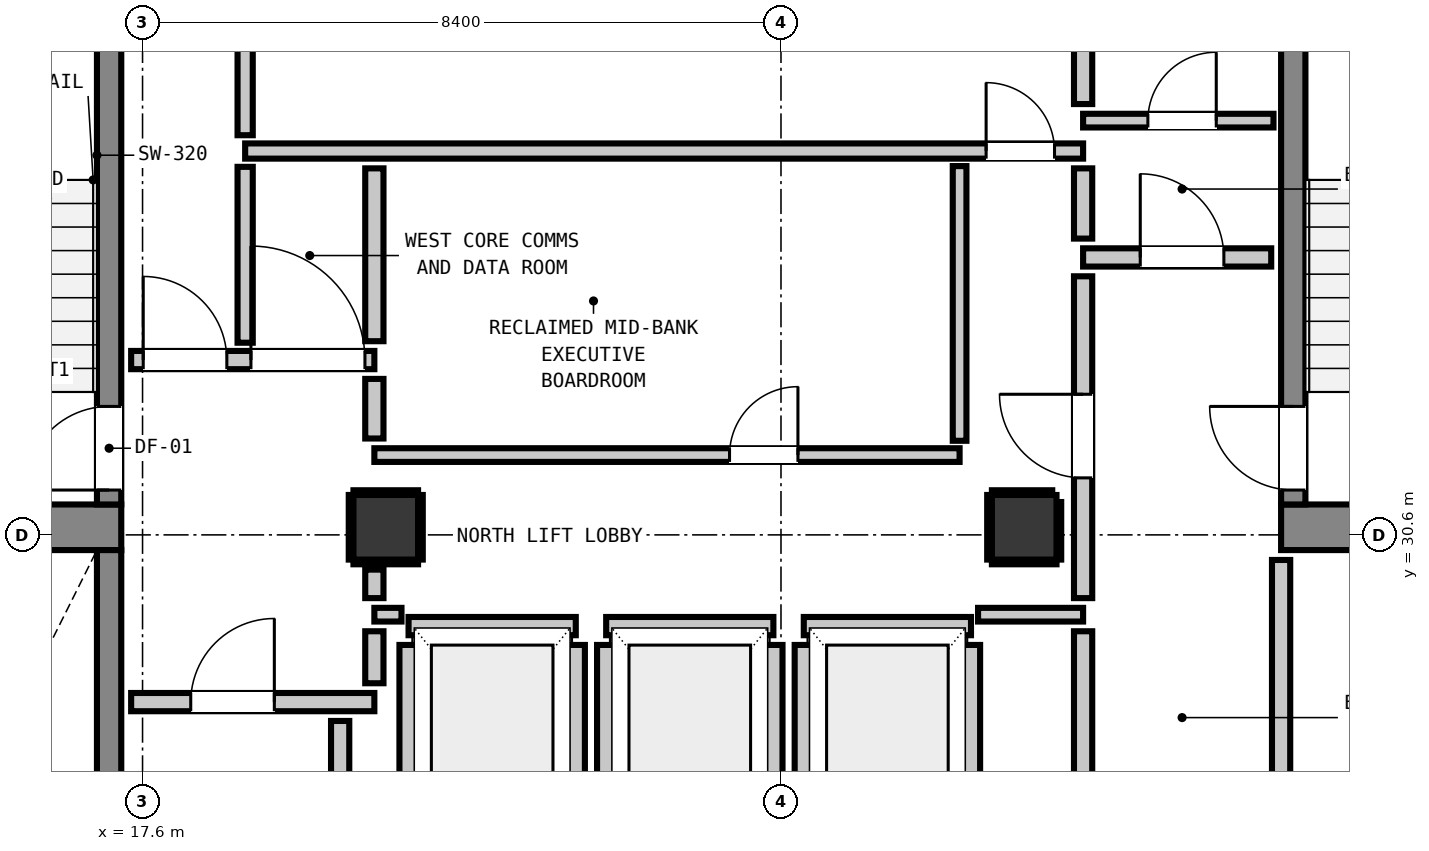
"""IFC4 building model, lengths in metres.
Left out: names, types, materials, properties, quantities, classifications, styles, units other than length and angle.
Written with IfcOpenShell. Run it as: python <this file> out.ifc"""

import sys

from ifc_helpers import new_model, si_unit, direction, frame, frame_2d, origin, origin_2d, place, context, subcontext, project, spatial, rectangle, extrude, element, fill, save


model = new_model("IFC4")
c1 = context("Model", 3, precision=1e-05, world=origin(), true_north=direction((0.0, 1.0)))
c2 = subcontext(c1, "Body", "Model", "MODEL_VIEW")
j1 = project(units=[si_unit("LENGTHUNIT", "METRE"), si_unit("PLANEANGLEUNIT", "RADIAN")], contexts=[c1])
p1 = place(None, origin())
s1 = spatial("IfcSite", under=j1, at=p1, CompositionType="ELEMENT")
p2 = place(p1, origin())
s2 = spatial("IfcBuilding", under=s1, at=p2, CompositionType="ELEMENT")
p3 = place(p2, frame((0.0, 0.0, 176.88)))
s3 = spatial("IfcBuildingStorey", under=s2, at=p3, CompositionType="ELEMENT", Elevation=176.88)
for number, where, z_axis, x_axis in (
    (1, (13.78, 30.7, 0.0), (0.0, 0.0, 1.0), (1.0, 0.0, 0.0)),
    (2, (32.58, 30.7, 0.0), (0.0, 0.0, 1.0), (1.0, 0.0, 0.0)),
):
    element("IfcWall", number, at=place(p3, frame(where, z_axis=z_axis, x_axis=x_axis)), inside=s3, PredefinedType="SHEAR", context=c2, shape_type="SweptSolid", body=[
        extrude(rectangle(XDim=3.54, YDim=0.6, at=frame_2d((1.77, 0.0))), origin(), (0.0, 0.0, 1.0), 3.32),
    ])
p4 = place(p3, frame((17.16, 31.0, 0.0), z_axis=(0.0, 0.0, 1.0), x_axis=(0.0, 1.0, 0.0)))
e3 = element("IfcWall", 3, at=p4, inside=s3, PredefinedType="SHEAR", context=c2, shape_type="SweptSolid", body=[
    extrude(rectangle(XDim=7.8, YDim=0.32, at=frame_2d((3.9, 0.0))), origin(), (0.0, 0.0, 1.0), 3.32),
])
p5 = place(p4, frame((0.19, 0.0, 0.0)))
e4 = element("IfcOpeningElement", 4, at=p5, cuts=e3, PredefinedType="OPENING", context=c2, shape_type="SweptSolid", body=[
    extrude(rectangle(XDim=1.1, YDim=2.15, at=frame_2d((0.55, 1.075))), frame((0.0, 0.17, 0.0), z_axis=(0.0, -1.0, 0.0), x_axis=(1.0, 0.0, 0.0)), (0.0, 0.0, 1.0), 0.34),
])
p6 = place(p3, frame((17.16, 22.4, 0.0), z_axis=(0.0, 0.0, 1.0), x_axis=(0.0, 1.0, 0.0)))
e5 = element("IfcWall", 5, at=p6, inside=s3, PredefinedType="SHEAR", context=c2, shape_type="SweptSolid", body=[
    extrude(rectangle(XDim=8.0, YDim=0.32, at=frame_2d((4.0, 0.0))), origin(), (0.0, 0.0, 1.0), 3.32),
])
p7 = place(p6, frame((0.39, 0.0, 0.0)))
e6 = element("IfcOpeningElement", 6, at=p7, cuts=e5, PredefinedType="OPENING", context=c2, shape_type="SweptSolid", body=[
    extrude(rectangle(XDim=1.1, YDim=2.15, at=frame_2d((0.55, 1.075))), frame((0.0, 0.17, 0.0), z_axis=(0.0, -1.0, 0.0), x_axis=(1.0, 0.0, 0.0)), (0.0, 0.0, 1.0), 0.34),
])
p8 = place(p3, frame((32.74, 31.0, 0.0), z_axis=(0.0, 0.0, 1.0), x_axis=(0.0, 1.0, 0.0)))
e7 = element("IfcWall", 7, at=p8, inside=s3, PredefinedType="SHEAR", context=c2, shape_type="SweptSolid", body=[
    extrude(rectangle(XDim=7.8, YDim=0.32, at=frame_2d((3.9, 0.0))), origin(), (0.0, 0.0, 1.0), 3.32),
])
p9 = place(p8, frame((0.19, 0.0, 0.0)))
e8 = element("IfcOpeningElement", 8, at=p9, cuts=e7, PredefinedType="OPENING", context=c2, shape_type="SweptSolid", body=[
    extrude(rectangle(XDim=1.1, YDim=2.15, at=frame_2d((0.55, 1.075))), frame((0.0, 0.17, 0.0), z_axis=(0.0, -1.0, 0.0), x_axis=(1.0, 0.0, 0.0)), (0.0, 0.0, 1.0), 0.34),
])
for number, where, z_axis, x_axis in (
    (9, (20.8, 30.7, 0.0), (0.0, 0.0, 1.0), (1.0, 0.0, 0.0)),
    (10, (29.2, 30.7, 0.0), (0.0, 0.0, 1.0), (1.0, 0.0, 0.0)),
):
    element("IfcColumn", number, at=place(p3, frame(where, z_axis=z_axis, x_axis=x_axis)), inside=s3, PredefinedType="COLUMN", context=c2, shape_type="SweptSolid", body=[
        extrude(rectangle(XDim=0.85, YDim=0.85, at=origin_2d()), origin(), (0.0, 0.0, 1.0), 3.32),
    ])
p10 = place(p3, frame((21.1, 29.4, 0.0), z_axis=(0.0, 0.0, 1.0), x_axis=(1.0, 0.0, 0.0)))
e11 = element("IfcWall", 11, at=p10, inside=s3, PredefinedType="PARTITIONING", context=c2, shape_type="SweptSolid", body=[
    extrude(rectangle(XDim=2.2, YDim=0.24, at=frame_2d((1.1, 0.0))), origin(), (0.0, 0.0, 1.0), 3.08),
])
p11 = place(p3, frame((21.1, 27.048, 0.0), z_axis=(0.0, 0.0, 1.0), x_axis=(0.0, 1.0, 0.0)))
e12 = element("IfcWall", 12, at=p11, inside=s3, PredefinedType="PARTITIONING", context=c2, shape_type="SweptSolid", body=[
    extrude(rectangle(XDim=2.104, YDim=0.24, at=frame_2d((1.052, 0.0))), origin(), (0.0, 0.0, 1.0), 2.315),
])
p12 = place(p3, frame((23.3, 27.048, 0.0), z_axis=(0.0, 0.0, 1.0), x_axis=(0.0, 1.0, 0.0)))
e13 = element("IfcWall", 13, at=p12, inside=s3, PredefinedType="PARTITIONING", context=c2, shape_type="SweptSolid", body=[
    extrude(rectangle(XDim=2.104, YDim=0.24, at=frame_2d((1.052, 0.0))), origin(), (0.0, 0.0, 1.0), 3.08),
])
p13 = place(p3, frame((23.7, 29.4, 0.0), z_axis=(0.0, 0.0, 1.0), x_axis=(1.0, 0.0, 0.0)))
e14 = element("IfcWall", 14, at=p13, inside=s3, PredefinedType="PARTITIONING", context=c2, shape_type="SweptSolid", body=[
    extrude(rectangle(XDim=2.2, YDim=0.24, at=frame_2d((1.1, 0.0))), origin(), (0.0, 0.0, 1.0), 3.08),
])
for number, where, z_axis, x_axis in (
    (15, (23.7, 27.048, 0.0), (0.0, 0.0, 1.0), (0.0, 1.0, 0.0)),
    (16, (25.9, 27.048, 0.0), (0.0, 0.0, 1.0), (0.0, 1.0, 0.0)),
):
    element("IfcWall", number, at=place(p3, frame(where, z_axis=z_axis, x_axis=x_axis)), inside=s3, PredefinedType="PARTITIONING", context=c2, shape_type="SweptSolid", body=[
        extrude(rectangle(XDim=2.104, YDim=0.24, at=frame_2d((1.052, 0.0))), origin(), (0.0, 0.0, 1.0), 3.08),
    ])
p14 = place(p3, frame((26.3, 29.4, 0.0), z_axis=(0.0, 0.0, 1.0), x_axis=(1.0, 0.0, 0.0)))
e17 = element("IfcWall", 17, at=p14, inside=s3, PredefinedType="PARTITIONING", context=c2, shape_type="SweptSolid", body=[
    extrude(rectangle(XDim=2.2, YDim=0.24, at=frame_2d((1.1, 0.0))), origin(), (0.0, 0.0, 1.0), 3.08),
])
p15 = place(p3, frame((26.3, 27.048, 0.0), z_axis=(0.0, 0.0, 1.0), x_axis=(0.0, 1.0, 0.0)))
e18 = element("IfcWall", 18, at=p15, inside=s3, PredefinedType="PARTITIONING", context=c2, shape_type="SweptSolid", body=[
    extrude(rectangle(XDim=2.104, YDim=0.24, at=frame_2d((1.052, 0.0))), origin(), (0.0, 0.0, 1.0), 3.08),
])
p16 = place(p3, frame((28.5, 27.33, 0.0), z_axis=(0.0, 0.0, 1.0), x_axis=(0.0, 1.0, 0.0)))
e19 = element("IfcWall", 19, at=p16, inside=s3, PredefinedType="PARTITIONING", context=c2, shape_type="SweptSolid", body=[
    extrude(rectangle(XDim=1.822, YDim=0.24, at=frame_2d((0.911, 0.0))), origin(), (0.0, 0.0, 1.0), 3.08),
])
p17 = place(p3, frame((17.45, 28.4, 0.0), z_axis=(0.0, 0.0, 1.0), x_axis=(1.0, 0.0, 0.0)))
e20 = element("IfcWall", 20, at=p17, inside=s3, PredefinedType="PARTITIONING", context=c2, shape_type="SweptSolid", body=[
    extrude(rectangle(XDim=3.2, YDim=0.24, at=frame_2d((1.6, 0.0))), origin(), (0.0, 0.0, 1.0), 3.08),
])
p18 = place(p17, frame((0.784, 0.0, 0.0)))
e21 = element("IfcOpeningElement", 21, at=p18, cuts=e20, PredefinedType="OPENING", context=c2, shape_type="SweptSolid", body=[
    extrude(rectangle(XDim=1.1, YDim=2.15, at=frame_2d((0.55, 1.075))), frame((0.0, 0.13, 0.0), z_axis=(0.0, -1.0, 0.0), x_axis=(1.0, 0.0, 0.0)), (0.0, 0.0, 1.0), 0.26),
])
p19 = place(p3, frame((17.45, 32.9, 0.0), z_axis=(0.0, 0.0, 1.0), x_axis=(1.0, 0.0, 0.0)))
e22 = element("IfcWall", 22, at=p19, inside=s3, PredefinedType="PARTITIONING", context=c2, shape_type="SweptSolid", body=[
    extrude(rectangle(XDim=3.2, YDim=0.24, at=frame_2d((1.6, 0.0))), origin(), (0.0, 0.0, 1.0), 3.08),
])
p20 = place(p19, frame((0.159, 0.0, 0.0)))
e23 = element("IfcOpeningElement", 23, at=p20, cuts=e22, PredefinedType="OPENING", context=c2, shape_type="SweptSolid", body=[
    extrude(rectangle(XDim=1.1, YDim=2.15, at=frame_2d((0.55, 1.075))), frame((0.0, 0.13, 0.0), z_axis=(0.0, -1.0, 0.0), x_axis=(1.0, 0.0, 0.0)), (0.0, 0.0, 1.0), 0.26),
])
p21 = place(p19, frame((1.576, 0.0, 0.0)))
e24 = element("IfcOpeningElement", 24, at=p21, cuts=e22, PredefinedType="OPENING", context=c2, shape_type="SweptSolid", body=[
    extrude(rectangle(XDim=1.5, YDim=2.15, at=frame_2d((0.75, 1.075))), frame((0.0, 0.13, 0.0), z_axis=(0.0, -1.0, 0.0), x_axis=(1.0, 0.0, 0.0)), (0.0, 0.0, 1.0), 0.26),
])
p22 = place(p3, frame((29.975, 34.25, 0.0), z_axis=(0.0, 0.0, 1.0), x_axis=(1.0, 0.0, 0.0)))
e25 = element("IfcWall", 25, at=p22, inside=s3, PredefinedType="PARTITIONING", context=c2, shape_type="SweptSolid", body=[
    extrude(rectangle(XDim=2.475, YDim=0.24, at=frame_2d((1.237, 0.0))), origin(), (0.0, 0.0, 1.0), 3.08),
])
p23 = place(p22, frame((0.752, 0.0, 0.0)))
e26 = element("IfcOpeningElement", 26, at=p23, cuts=e25, PredefinedType="OPENING", context=c2, shape_type="SweptSolid", body=[
    extrude(rectangle(XDim=1.1, YDim=2.15, at=frame_2d((0.55, 1.075))), frame((0.0, 0.13, 0.0), z_axis=(0.0, -1.0, 0.0), x_axis=(1.0, 0.0, 0.0)), (0.0, 0.0, 1.0), 0.26),
])
p24 = place(p3, frame((18.95, 35.65, 0.0), z_axis=(0.0, 0.0, 1.0), x_axis=(1.0, 0.0, 0.0)))
e27 = element("IfcWall", 27, at=p24, inside=s3, PredefinedType="PARTITIONING", context=c2, shape_type="SweptSolid", body=[
    extrude(rectangle(XDim=11.025, YDim=0.2, at=frame_2d((5.513, 0.0))), origin(), (0.0, 0.0, 1.0), 3.08),
])
p25 = place(p24, frame((9.749, 0.0, 0.0)))
e28 = element("IfcOpeningElement", 28, at=p25, cuts=e27, PredefinedType="OPENING", context=c2, shape_type="SweptSolid", body=[
    extrude(rectangle(XDim=0.9, YDim=2.1, at=frame_2d((0.45, 1.05))), frame((0.0, 0.11, 0.0), z_axis=(0.0, -1.0, 0.0), x_axis=(1.0, 0.0, 0.0)), (0.0, 0.0, 1.0), 0.22),
])
p26 = place(p3, frame((20.65, 29.55, 0.0), z_axis=(0.0, 0.0, 1.0), x_axis=(1.0, 0.0, 0.0)))
e29 = element("IfcWall", 29, at=p26, inside=s3, PredefinedType="PARTITIONING", context=c2, shape_type="SweptSolid", body=[
    extrude(rectangle(XDim=0.357, YDim=0.18, at=frame_2d((0.179, 0.0))), origin(), (0.0, 0.0, 1.0), 3.08),
])
p27 = place(p3, frame((28.593, 29.55, 0.0), z_axis=(0.0, 0.0, 1.0), x_axis=(1.0, 0.0, 0.0)))
e30 = element("IfcWall", 30, at=p27, inside=s3, PredefinedType="PARTITIONING", context=c2, shape_type="SweptSolid", body=[
    extrude(rectangle(XDim=1.382, YDim=0.18, at=frame_2d((0.691, 0.0))), origin(), (0.0, 0.0, 1.0), 3.08),
])
p28 = place(p3, frame((20.65, 31.65, 0.0), z_axis=(0.0, 0.0, 1.0), x_axis=(1.0, 0.0, 0.0)))
e31 = element("IfcWall", 31, at=p28, inside=s3, PredefinedType="PARTITIONING", context=c2, shape_type="SweptSolid", body=[
    extrude(rectangle(XDim=7.7, YDim=0.18, at=frame_2d((3.85, 0.0))), origin(), (0.0, 0.0, 1.0), 3.08),
])
p29 = place(p28, frame((4.673, 0.0, 0.0)))
e32 = element("IfcOpeningElement", 32, at=p29, cuts=e31, PredefinedType="OPENING", context=c2, shape_type="SweptSolid", body=[
    extrude(rectangle(XDim=0.9, YDim=2.1, at=frame_2d((0.45, 1.05))), frame((0.0, 0.1, 0.0), z_axis=(0.0, -1.0, 0.0), x_axis=(1.0, 0.0, 0.0)), (0.0, 0.0, 1.0), 0.2),
])
p30 = place(p3, frame((29.975, 36.05, 0.0), z_axis=(0.0, 0.0, 1.0), x_axis=(1.0, 0.0, 0.0)))
e33 = element("IfcWall", 33, at=p30, inside=s3, PredefinedType="PARTITIONING", context=c2, shape_type="SweptSolid", body=[
    extrude(rectangle(XDim=2.505, YDim=0.18, at=frame_2d((1.252, 0.0))), origin(), (0.0, 0.0, 1.0), 3.08),
])
p31 = place(p30, frame((0.852, 0.0, 0.0)))
e34 = element("IfcOpeningElement", 34, at=p31, cuts=e33, PredefinedType="OPENING", context=c2, shape_type="SweptSolid", body=[
    extrude(rectangle(XDim=0.9, YDim=2.1, at=frame_2d((0.45, 1.05))), frame((0.0, 0.1, 0.0), z_axis=(0.0, -1.0, 0.0), x_axis=(1.0, 0.0, 0.0)), (0.0, 0.0, 1.0), 0.2),
])
p32 = place(p3, frame((20.2, 21.398, 0.0), z_axis=(0.0, 0.0, 1.0), x_axis=(0.0, 1.0, 0.0)))
e35 = element("IfcWall", 35, at=p32, inside=s3, PredefinedType="PARTITIONING", context=c2, shape_type="SweptSolid", body=[
    extrude(rectangle(XDim=6.754, YDim=0.24, at=frame_2d((3.377, 0.0))), origin(), (0.0, 0.0, 1.0), 3.08),
])
p33 = place(p3, frame((20.65, 28.648, 0.0), z_axis=(0.0, 0.0, 1.0), x_axis=(0.0, 1.0, 0.0)))
e36 = element("IfcWall", 36, at=p33, inside=s3, PredefinedType="PARTITIONING", context=c2, shape_type="SweptSolid", body=[
    extrude(rectangle(XDim=0.684, YDim=0.24, at=frame_2d((0.342, 0.0))), origin(), (0.0, 0.0, 1.0), 2.315),
])
p34 = place(p3, frame((20.65, 29.768, 0.0), z_axis=(0.0, 0.0, 1.0), x_axis=(0.0, 1.0, 0.0)))
e37 = element("IfcWall", 37, at=p34, inside=s3, PredefinedType="PARTITIONING", context=c2, shape_type="SweptSolid", body=[
    extrude(rectangle(XDim=0.375, YDim=0.24, at=frame_2d((0.188, 0.0))), origin(), (0.0, 0.0, 1.0), 2.315),
])
p35 = place(p3, frame((20.65, 31.868, 0.0), z_axis=(0.0, 0.0, 1.0), x_axis=(0.0, 1.0, 0.0)))
e38 = element("IfcWall", 38, at=p35, inside=s3, PredefinedType="PARTITIONING", context=c2, shape_type="SweptSolid", body=[
    extrude(rectangle(XDim=0.784, YDim=0.24, at=frame_2d((0.392, 0.0))), origin(), (0.0, 0.0, 1.0), 2.315),
])
p36 = place(p3, frame((20.65, 33.148, 0.0), z_axis=(0.0, 0.0, 1.0), x_axis=(0.0, 1.0, 0.0)))
e39 = element("IfcWall", 39, at=p36, inside=s3, PredefinedType="PARTITIONING", context=c2, shape_type="SweptSolid", body=[
    extrude(rectangle(XDim=2.274, YDim=0.24, at=frame_2d((1.137, 0.0))), origin(), (0.0, 0.0, 1.0), 2.315),
])
p37 = place(p3, frame((29.975, 25.648, 0.0), z_axis=(0.0, 0.0, 1.0), x_axis=(0.0, 1.0, 0.0)))
e40 = element("IfcWall", 40, at=p37, inside=s3, PredefinedType="PARTITIONING", context=c2, shape_type="SweptSolid", body=[
    extrude(rectangle(XDim=3.684, YDim=0.24, at=frame_2d((1.842, 0.0))), origin(), (0.0, 0.0, 1.0), 3.08),
])
p38 = place(p3, frame((29.975, 29.768, 0.0), z_axis=(0.0, 0.0, 1.0), x_axis=(0.0, 1.0, 0.0)))
e41 = element("IfcWall", 41, at=p38, inside=s3, PredefinedType="PARTITIONING", context=c2, shape_type="SweptSolid", body=[
    extrude(rectangle(XDim=4.234, YDim=0.24, at=frame_2d((2.117, 0.0))), origin(), (0.0, 0.0, 1.0), 3.08),
])
p39 = place(p38, frame((1.582, 0.0, 0.0)))
e42 = element("IfcOpeningElement", 42, at=p39, cuts=e41, PredefinedType="OPENING", context=c2, shape_type="SweptSolid", body=[
    extrude(rectangle(XDim=1.1, YDim=2.15, at=frame_2d((0.55, 1.075))), frame((0.0, 0.13, 0.0), z_axis=(0.0, -1.0, 0.0), x_axis=(1.0, 0.0, 0.0)), (0.0, 0.0, 1.0), 0.26),
])
p40 = place(p3, frame((29.975, 34.498, 0.0), z_axis=(0.0, 0.0, 1.0), x_axis=(0.0, 1.0, 0.0)))
e43 = element("IfcWall", 43, at=p40, inside=s3, PredefinedType="PARTITIONING", context=c2, shape_type="SweptSolid", body=[
    extrude(rectangle(XDim=0.924, YDim=0.24, at=frame_2d((0.462, 0.0))), origin(), (0.0, 0.0, 1.0), 3.08),
])
p41 = place(p3, frame((29.975, 36.268, 0.0), z_axis=(0.0, 0.0, 1.0), x_axis=(0.0, 1.0, 0.0)))
e44 = element("IfcWall", 44, at=p41, inside=s3, PredefinedType="PARTITIONING", context=c2, shape_type="SweptSolid", body=[
    extrude(rectangle(XDim=2.294, YDim=0.24, at=frame_2d((1.147, 0.0))), origin(), (0.0, 0.0, 1.0), 3.08),
])
p42 = place(p3, frame((32.58, 25.648, 0.0), z_axis=(0.0, 0.0, 1.0), x_axis=(0.0, 1.0, 0.0)))
e45 = element("IfcWall", 45, at=p42, inside=s3, PredefinedType="PARTITIONING", context=c2, shape_type="SweptSolid", body=[
    extrude(rectangle(XDim=4.622, YDim=0.24, at=frame_2d((2.311, 0.0))), origin(), (0.0, 0.0, 1.0), 3.08),
])
p43 = place(p3, frame((18.95, 33.128, 0.0), z_axis=(0.0, 0.0, 1.0), x_axis=(0.0, 1.0, 0.0)))
e46 = element("IfcWall", 46, at=p43, inside=s3, PredefinedType="PARTITIONING", context=c2, shape_type="SweptSolid", body=[
    extrude(rectangle(XDim=2.314, YDim=0.2, at=frame_2d((1.157, 0.0))), origin(), (0.0, 0.0, 1.0), 3.08),
])
p44 = place(p3, frame((18.95, 35.858, 0.0), z_axis=(0.0, 0.0, 1.0), x_axis=(0.0, 1.0, 0.0)))
e47 = element("IfcWall", 47, at=p44, inside=s3, PredefinedType="PARTITIONING", context=c2, shape_type="SweptSolid", body=[
    extrude(rectangle(XDim=2.724, YDim=0.2, at=frame_2d((1.362, 0.0))), origin(), (0.0, 0.0, 1.0), 3.08),
])
p45 = place(p3, frame((28.35, 31.838, 0.0), z_axis=(0.0, 0.0, 1.0), x_axis=(0.0, 1.0, 0.0)))
e48 = element("IfcWall", 48, at=p45, inside=s3, PredefinedType="PARTITIONING", context=c2, shape_type="SweptSolid", body=[
    extrude(rectangle(XDim=3.614, YDim=0.18, at=frame_2d((1.807, 0.0))), origin(), (0.0, 0.0, 1.0), 3.08),
])
for number, where, z_axis, x_axis in (
    (49, (20.375, 30.243, 0.0), (0.0, 0.0, 1.0), (1.0, 0.0, 0.0)),
    (50, (20.375, 31.157, 0.0), (0.0, 0.0, 1.0), (1.0, 0.0, 0.0)),
    (51, (20.343, 30.275, 0.0), (0.0, 0.0, 1.0), (0.0, 1.0, 0.0)),
    (52, (21.257, 30.275, 0.0), (0.0, 0.0, 1.0), (0.0, 1.0, 0.0)),
    (53, (28.775, 30.243, 0.0), (0.0, 0.0, 1.0), (1.0, 0.0, 0.0)),
):
    element("IfcWall", number, at=place(p3, frame(where, z_axis=z_axis, x_axis=x_axis)), inside=s3, PredefinedType="PARTITIONING", context=c2, shape_type="SweptSolid", body=[
        extrude(rectangle(XDim=0.85, YDim=0.06, at=frame_2d((0.425, 0.0))), origin(), (0.0, 0.0, 1.0), 1.45),
    ])
p46 = place(p3, frame((28.775, 31.157, 0.0), z_axis=(0.0, 0.0, 1.0), x_axis=(1.0, 0.0, 0.0)))
e54 = element("IfcWall", 54, at=p46, inside=s3, PredefinedType="PARTITIONING", context=c2, shape_type="SweptSolid", body=[
    extrude(rectangle(XDim=0.794, YDim=0.06, at=frame_2d((0.397, 0.0))), origin(), (0.0, 0.0, 1.0), 1.45),
])
p47 = place(p3, frame((28.743, 30.275, 0.0), z_axis=(0.0, 0.0, 1.0), x_axis=(0.0, 1.0, 0.0)))
e55 = element("IfcWall", 55, at=p47, inside=s3, PredefinedType="PARTITIONING", context=c2, shape_type="SweptSolid", body=[
    extrude(rectangle(XDim=0.85, YDim=0.06, at=frame_2d((0.425, 0.0))), origin(), (0.0, 0.0, 1.0), 1.45),
])
p48 = place(p3, frame((29.657, 30.275, 0.0), z_axis=(0.0, 0.0, 1.0), x_axis=(0.0, 1.0, 0.0)))
e56 = element("IfcWall", 56, at=p48, inside=s3, PredefinedType="PARTITIONING", context=c2, shape_type="SweptSolid", body=[
    extrude(rectangle(XDim=0.757, YDim=0.06, at=frame_2d((0.378, 0.0))), origin(), (0.0, 0.0, 1.0), 1.45),
])
p49 = place(p5, origin())
e57 = element("IfcDoor", 57, at=p49, inside=s3, OperationType="SINGLE_SWING_LEFT", PredefinedType="DOOR", context=c2, shape_type="SweptSolid", body=[
    extrude(rectangle(XDim=1.1, YDim=2.15, at=frame_2d((0.55, 1.075))), frame((0.0, 0.025, 0.0), z_axis=(0.0, -1.0, 0.0), x_axis=(1.0, 0.0, 0.0)), (0.0, 0.0, 1.0), 0.05),
])
fill(e4, e57)
p50 = place(p9, origin())
e58 = element("IfcDoor", 58, at=p50, inside=s3, OperationType="SINGLE_SWING_RIGHT", PredefinedType="DOOR", context=c2, shape_type="SweptSolid", body=[
    extrude(rectangle(XDim=1.1, YDim=2.15, at=frame_2d((0.55, 1.075))), frame((0.0, 0.025, 0.0), z_axis=(0.0, -1.0, 0.0), x_axis=(1.0, 0.0, 0.0)), (0.0, 0.0, 1.0), 0.05),
])
fill(e8, e58)
p51 = place(p18, origin())
e59 = element("IfcDoor", 59, at=p51, inside=s3, OperationType="SINGLE_SWING_RIGHT", PredefinedType="DOOR", context=c2, shape_type="SweptSolid", body=[
    extrude(rectangle(XDim=1.1, YDim=2.15, at=frame_2d((0.55, 1.075))), frame((0.0, 0.025, 0.0), z_axis=(0.0, -1.0, 0.0), x_axis=(1.0, 0.0, 0.0)), (0.0, 0.0, 1.0), 0.05),
])
fill(e21, e59)
p52 = place(p20, origin())
e60 = element("IfcDoor", 60, at=p52, inside=s3, OperationType="SINGLE_SWING_LEFT", PredefinedType="DOOR", context=c2, shape_type="SweptSolid", body=[
    extrude(rectangle(XDim=1.1, YDim=2.15, at=frame_2d((0.55, 1.075))), frame((0.0, 0.025, 0.0), z_axis=(0.0, -1.0, 0.0), x_axis=(1.0, 0.0, 0.0)), (0.0, 0.0, 1.0), 0.05),
])
fill(e23, e60)
p53 = place(p39, origin())
e61 = element("IfcDoor", 61, at=p53, inside=s3, OperationType="SINGLE_SWING_RIGHT", PredefinedType="DOOR", context=c2, shape_type="SweptSolid", body=[
    extrude(rectangle(XDim=1.1, YDim=2.15, at=frame_2d((0.55, 1.075))), frame((0.0, 0.025, 0.0), z_axis=(0.0, -1.0, 0.0), x_axis=(1.0, 0.0, 0.0)), (0.0, 0.0, 1.0), 0.05),
])
fill(e42, e61)
p54 = place(p23, origin())
e62 = element("IfcDoor", 62, at=p54, inside=s3, OperationType="SINGLE_SWING_LEFT", PredefinedType="DOOR", context=c2, shape_type="SweptSolid", body=[
    extrude(rectangle(XDim=1.1, YDim=2.15, at=frame_2d((0.55, 1.075))), frame((0.0, 0.025, 0.0), z_axis=(0.0, -1.0, 0.0), x_axis=(1.0, 0.0, 0.0)), (0.0, 0.0, 1.0), 0.05),
])
fill(e26, e62)
p55 = place(p21, origin())
e63 = element("IfcDoor", 63, at=p55, inside=s3, OperationType="SINGLE_SWING_LEFT", PredefinedType="DOOR", context=c2, shape_type="SweptSolid", body=[
    extrude(rectangle(XDim=1.5, YDim=2.15, at=frame_2d((0.75, 1.075))), frame((0.0, 0.025, 0.0), z_axis=(0.0, -1.0, 0.0), x_axis=(1.0, 0.0, 0.0)), (0.0, 0.0, 1.0), 0.05),
])
fill(e24, e63)
p56 = place(p31, origin())
e64 = element("IfcDoor", 64, at=p56, inside=s3, OperationType="SINGLE_SWING_RIGHT", PredefinedType="DOOR", context=c2, shape_type="SweptSolid", body=[
    extrude(rectangle(XDim=0.9, YDim=2.1, at=frame_2d((0.45, 1.05))), frame((0.0, 0.025, 0.0), z_axis=(0.0, -1.0, 0.0), x_axis=(1.0, 0.0, 0.0)), (0.0, 0.0, 1.0), 0.05),
])
fill(e34, e64)
p57 = place(p25, origin())
e65 = element("IfcDoor", 65, at=p57, inside=s3, OperationType="SINGLE_SWING_LEFT", PredefinedType="DOOR", context=c2, shape_type="SweptSolid", body=[
    extrude(rectangle(XDim=0.9, YDim=2.1, at=frame_2d((0.45, 1.05))), frame((0.0, 0.025, 0.0), z_axis=(0.0, -1.0, 0.0), x_axis=(1.0, 0.0, 0.0)), (0.0, 0.0, 1.0), 0.05),
])
fill(e28, e65)
p58 = place(p29, origin())
e66 = element("IfcDoor", 66, at=p58, inside=s3, OperationType="SINGLE_SWING_RIGHT", PredefinedType="DOOR", context=c2, shape_type="SweptSolid", body=[
    extrude(rectangle(XDim=0.9, YDim=2.1, at=frame_2d((0.45, 1.05))), frame((0.0, 0.025, 0.0), z_axis=(0.0, -1.0, 0.0), x_axis=(1.0, 0.0, 0.0)), (0.0, 0.0, 1.0), 0.05),
])
fill(e32, e66)
save(model, sys.argv[1])
